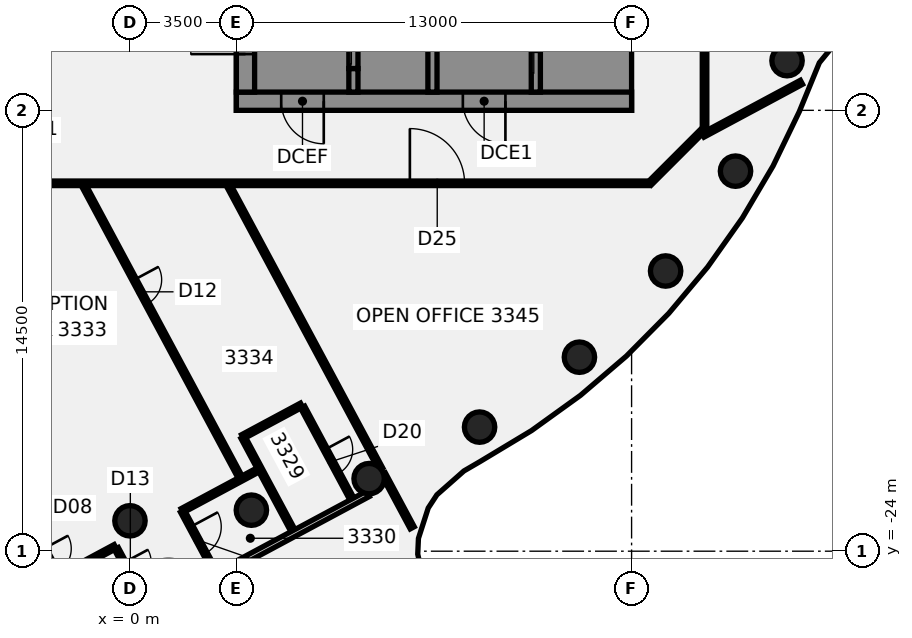
"""IFC4 building model, lengths in metres.
Left out: names, types, materials, properties, quantities, classifications, styles, units other than length and angle.
Written with IfcOpenShell. Run it as: python <this file> out.ifc"""

import sys

from ifc_helpers import new_model, si_unit, direction, frame, frame_2d, origin, origin_2d, place, context, subcontext, project, spatial, polyline, rectangle, circle, outline, extrude, element, fill, save


model = new_model("IFC4")
c1 = context("Model", 3, precision=1e-05, world=origin(), true_north=direction((0.0, 1.0)))
c2 = subcontext(c1, "Body", "Model", "MODEL_VIEW")
j1 = project(units=[si_unit("LENGTHUNIT", "METRE"), si_unit("PLANEANGLEUNIT", "RADIAN")], contexts=[c1])
p1 = place(None, origin())
s1 = spatial("IfcSite", under=j1, at=p1, CompositionType="ELEMENT")
p2 = place(p1, origin())
s2 = spatial("IfcBuilding", under=s1, at=p2, CompositionType="ELEMENT")
p3 = place(p2, frame((0.0, 0.0, 136.75)))
s3 = spatial("IfcBuildingStorey", under=s2, at=p3, CompositionType="ELEMENT", Elevation=136.75)
for number, where, z_axis, x_axis in (
    (1, (0.0, -23.0, -0.14), (0.0, 0.0, 1.0), (1.0, 0.0, 0.0)),
    (2, (3.994, -22.651, -0.14), (0.0, 0.0, 1.0), (1.0, 0.0, 0.0)),
    (3, (7.866, -21.613, -0.14), (0.0, 0.0, 1.0), (1.0, 0.0, 0.0)),
    (4, (11.5, -19.919, -0.14), (0.0, 0.0, 1.0), (1.0, 0.0, 0.0)),
    (5, (14.784, -17.619, -0.14), (0.0, 0.0, 1.0), (1.0, 0.0, 0.0)),
    (6, (17.619, -14.784, -0.14), (0.0, 0.0, 1.0), (1.0, 0.0, 0.0)),
    (7, (19.919, -11.5, -0.14), (0.0, 0.0, 1.0), (1.0, 0.0, 0.0)),
    (8, (21.613, -7.866, -0.14), (0.0, 0.0, 1.0), (1.0, 0.0, 0.0)),
):
    element("IfcColumn", number, at=place(p3, frame(where, z_axis=z_axis, x_axis=x_axis)), inside=s3, PredefinedType="COLUMN", context=c2, shape_type="SweptSolid", body=[
        extrude(circle(Radius=0.5, at=origin_2d()), origin(), (0.0, 0.0, 1.0), 3.75),
    ])
p4 = place(p3, frame((-3.492, -22.682, 0.0), z_axis=(0.0, 0.0, 1.0), x_axis=(0.472689207633, -0.881229205705, 0.0)))
e9 = element("IfcWall", 9, at=p4, inside=s3, PredefinedType="PARTITIONING", context=c2, shape_type="SweptSolid", body=[
    extrude(rectangle(XDim=4.75, YDim=0.15, at=frame_2d((2.375, 0.0))), origin(), (0.0, 0.0, 1.0), 3.01),
])
p5 = place(p4, frame((1.399, 0.0, 0.0)))
e10 = element("IfcOpeningElement", 10, at=p5, cuts=e9, PredefinedType="OPENING", context=c2, shape_type="SweptSolid", body=[
    extrude(rectangle(XDim=0.9, YDim=2.1, at=frame_2d((0.45, 1.05))), frame((0.0, 0.085, 0.0), z_axis=(0.0, -1.0, 0.0), x_axis=(1.0, 0.0, 0.0)), (0.0, 0.0, 1.0), 0.17),
])
p6 = place(p3, frame((-1.51, -11.992, 0.0), z_axis=(0.0, 0.0, 1.0), x_axis=(0.472657089114, -0.881246433247, 0.0)))
e11 = element("IfcWall", 11, at=p6, inside=s3, PredefinedType="PARTITIONING", context=c2, shape_type="SweptSolid", body=[
    extrude(rectangle(XDim=10.853, YDim=0.15, at=frame_2d((5.426, 0.0))), origin(), (0.0, 0.0, 1.0), 3.01),
])
p7 = place(p6, frame((3.495, 0.0, 0.0)))
e12 = element("IfcOpeningElement", 12, at=p7, cuts=e11, PredefinedType="OPENING", context=c2, shape_type="SweptSolid", body=[
    extrude(rectangle(XDim=0.9, YDim=2.1, at=frame_2d((0.45, 1.05))), frame((0.0, 0.085, 0.0), z_axis=(0.0, -1.0, 0.0), x_axis=(1.0, 0.0, 0.0)), (0.0, 0.0, 1.0), 0.17),
])
p8 = place(p3, frame((-0.448, -23.914, 0.0), z_axis=(0.0, 0.0, 1.0), x_axis=(0.472830170136, -0.881153579241, 0.0)))
e13 = element("IfcWall", 13, at=p8, inside=s3, PredefinedType="PARTITIONING", context=c2, shape_type="SweptSolid", body=[
    extrude(rectangle(XDim=2.225, YDim=0.15, at=frame_2d((1.113, 0.0))), origin(), (0.0, 0.0, 1.0), 3.01),
])
p9 = place(p8, frame((0.525, 0.0, 0.0)))
e14 = element("IfcOpeningElement", 14, at=p9, cuts=e13, PredefinedType="OPENING", context=c2, shape_type="SweptSolid", body=[
    extrude(rectangle(XDim=0.9, YDim=2.1, at=frame_2d((0.45, 1.05))), frame((0.0, 0.085, 0.0), z_axis=(0.0, -1.0, 0.0), x_axis=(1.0, 0.0, 0.0)), (0.0, 0.0, 1.0), 0.17),
])
p10 = place(p3, frame((1.729, -22.684, 0.0), z_axis=(0.0, 0.0, 1.0), x_axis=(0.47285390864, -0.881140840663, 0.0)))
e15 = element("IfcWall", 15, at=p10, inside=s3, PredefinedType="PARTITIONING", context=c2, shape_type="SweptSolid", body=[
    extrude(rectangle(XDim=20.305, YDim=0.15, at=frame_2d((10.152, 0.0))), origin(), (0.0, 0.0, 1.0), 3.01),
])
p11 = place(p10, frame((0.58, 0.0, 0.0)))
e16 = element("IfcOpeningElement", 16, at=p11, cuts=e15, PredefinedType="OPENING", context=c2, shape_type="SweptSolid", body=[
    extrude(rectangle(XDim=1.0, YDim=2.1, at=frame_2d((0.5, 1.05))), frame((0.0, 0.085, 0.0), z_axis=(0.0, -1.0, 0.0), x_axis=(1.0, 0.0, 0.0)), (0.0, 0.0, 1.0), 0.17),
])
p12 = place(p10, frame((10.63, 0.0, 0.0)))
e17 = element("IfcOpeningElement", 17, at=p12, cuts=e15, PredefinedType="OPENING", context=c2, shape_type="SweptSolid", body=[
    extrude(rectangle(XDim=0.9, YDim=2.1, at=frame_2d((0.45, 1.05))), frame((0.0, 0.085, 0.0), z_axis=(0.0, -1.0, 0.0), x_axis=(1.0, 0.0, 0.0)), (0.0, 0.0, 1.0), 0.17),
])
p13 = place(p10, frame((17.081, 0.0, 0.0)))
e18 = element("IfcOpeningElement", 18, at=p13, cuts=e15, PredefinedType="OPENING", context=c2, shape_type="SweptSolid", body=[
    extrude(rectangle(XDim=0.9, YDim=2.1, at=frame_2d((0.45, 1.05))), frame((0.0, 0.085, 0.0), z_axis=(0.0, -1.0, 0.0), x_axis=(1.0, 0.0, 0.0)), (0.0, 0.0, 1.0), 0.17),
])
p14 = place(p3, frame((3.257, -11.992, 0.0), z_axis=(0.0, 0.0, 1.0), x_axis=(0.47270123822, -0.881222752421, 0.0)))
e19 = element("IfcWall", 19, at=p14, inside=s3, PredefinedType="PARTITIONING", context=c2, shape_type="SweptSolid", body=[
    extrude(rectangle(XDim=10.56, YDim=0.15, at=frame_2d((5.28, 0.0))), origin(), (0.0, 0.0, 1.0), 3.01),
])
p15 = place(p3, frame((8.336, -21.461, 0.0), z_axis=(0.0, 0.0, 1.0), x_axis=(0.472700307112, -0.881223251881, 0.0)))
e20 = element("IfcWall", 20, at=p15, inside=s3, PredefinedType="PARTITIONING", context=c2, shape_type="SweptSolid", body=[
    extrude(rectangle(XDim=2.009, YDim=0.15, at=frame_2d((1.004, 0.0))), origin(), (0.0, 0.0, 1.0), 3.01),
])
p16 = place(p3, frame((3.717, -20.256, 0.0), z_axis=(0.0, 0.0, 1.0), x_axis=(0.472400501261, -0.881384006213, 0.0)))
e21 = element("IfcWall", 21, at=p16, inside=s3, PredefinedType="PARTITIONING", context=c2, shape_type="SweptSolid", body=[
    extrude(rectangle(XDim=3.48, YDim=0.15, at=frame_2d((1.74, 0.0))), origin(), (0.0, 0.0, 1.0), 3.01),
])
p17 = place(p3, frame((5.681, -19.264, 0.0), z_axis=(0.0, 0.0, 1.0), x_axis=(0.472694703545, -0.881226257689, 0.0)))
e22 = element("IfcWall", 22, at=p17, inside=s3, PredefinedType="PARTITIONING", context=c2, shape_type="SweptSolid", body=[
    extrude(rectangle(XDim=3.421, YDim=0.15, at=frame_2d((1.71, 0.0))), origin(), (0.0, 0.0, 1.0), 3.01),
])
p18 = place(p17, frame((1.575, 0.0, 0.0)))
e23 = element("IfcOpeningElement", 23, at=p18, cuts=e22, PredefinedType="OPENING", context=c2, shape_type="SweptSolid", body=[
    extrude(rectangle(XDim=0.9, YDim=2.1, at=frame_2d((0.45, 1.05))), frame((0.0, 0.085, 0.0), z_axis=(0.0, -1.0, 0.0), x_axis=(1.0, 0.0, 0.0)), (0.0, 0.0, 1.0), 0.17),
])
p19 = place(p3, frame((-17.1, -11.9, 0.0), z_axis=(0.0, 0.0, 1.0), x_axis=(1.0, 0.0, 0.0)))
e24 = element("IfcWall", 24, at=p19, inside=s3, PredefinedType="PARTITIONING", context=c2, shape_type="SweptSolid", body=[
    extrude(rectangle(XDim=34.165, YDim=0.15, at=frame_2d((17.083, 0.0))), origin(), (0.0, 0.0, 1.0), 3.01),
])
p20 = place(p19, frame((10.824, 0.0, 0.0)))
e25 = element("IfcOpeningElement", 25, at=p20, cuts=e24, PredefinedType="OPENING", context=c2, shape_type="SweptSolid", body=[
    extrude(rectangle(XDim=1.8, YDim=2.1, at=frame_2d((0.9, 1.05))), frame((0.0, 0.085, 0.0), z_axis=(0.0, -1.0, 0.0), x_axis=(1.0, 0.0, 0.0)), (0.0, 0.0, 1.0), 0.17),
])
p21 = place(p19, frame((1.65, 0.0, 0.0)))
e26 = element("IfcOpeningElement", 26, at=p21, cuts=e24, PredefinedType="OPENING", context=c2, shape_type="SweptSolid", body=[
    extrude(rectangle(XDim=1.8, YDim=2.1, at=frame_2d((0.9, 1.05))), frame((0.0, 0.085, 0.0), z_axis=(0.0, -1.0, 0.0), x_axis=(1.0, 0.0, 0.0)), (0.0, 0.0, 1.0), 0.17),
])
p22 = place(p19, frame((26.307, 0.0, 0.0)))
e27 = element("IfcOpeningElement", 27, at=p22, cuts=e24, PredefinedType="OPENING", context=c2, shape_type="SweptSolid", body=[
    extrude(rectangle(XDim=1.8, YDim=2.1, at=frame_2d((0.9, 1.05))), frame((0.0, 0.085, 0.0), z_axis=(0.0, -1.0, 0.0), x_axis=(1.0, 0.0, 0.0)), (0.0, 0.0, 1.0), 0.17),
])
p23 = place(p3, frame((3.707, -20.235, 0.0), z_axis=(0.0, 0.0, 1.0), x_axis=(0.881086943658, 0.472954329419, 0.0)))
e28 = element("IfcWall", 28, at=p23, inside=s3, PredefinedType="PARTITIONING", context=c2, shape_type="SweptSolid", body=[
    extrude(rectangle(XDim=2.199, YDim=0.15, at=frame_2d((1.1, 0.0))), origin(), (0.0, 0.0, 1.0), 3.01),
])
p24 = place(p3, frame((-4.107, -28.515, 0.0), z_axis=(0.0, 0.0, 1.0), x_axis=(0.881221254129, 0.472704031368, 0.0)))
e29 = element("IfcWall", 29, at=p24, inside=s3, PredefinedType="PARTITIONING", context=c2, shape_type="SweptSolid", body=[
    extrude(rectangle(XDim=13.545, YDim=0.2, at=frame_2d((6.772, 0.0))), origin(), (0.0, 0.0, 1.0), 3.01),
])
p25 = place(p24, frame((6.099, 0.0, 0.0)))
e30 = element("IfcOpeningElement", 30, at=p25, cuts=e29, PredefinedType="OPENING", context=c2, shape_type="SweptSolid", body=[
    extrude(rectangle(XDim=1.4, YDim=2.1, at=frame_2d((0.7, 1.05))), frame((0.0, 0.11, 0.0), z_axis=(0.0, -1.0, 0.0), x_axis=(1.0, 0.0, 0.0)), (0.0, 0.0, 1.0), 0.22),
])
p26 = place(p3, frame((-2.268, -24.805, 0.0), z_axis=(0.0, 0.0, 1.0), x_axis=(0.881101445607, 0.472927312121, 0.0)))
e31 = element("IfcWall", 31, at=p26, inside=s3, PredefinedType="PARTITIONING", context=c2, shape_type="SweptSolid", body=[
    extrude(rectangle(XDim=2.025, YDim=0.15, at=frame_2d((1.012, 0.0))), origin(), (0.0, 0.0, 1.0), 3.01),
])
p27 = place(p3, frame((1.719, -22.666, 0.0), z_axis=(0.0, 0.0, 1.0), x_axis=(0.881125139321, 0.47288316618, 0.0)))
e32 = element("IfcWall", 32, at=p27, inside=s3, PredefinedType="PARTITIONING", context=c2, shape_type="SweptSolid", body=[
    extrude(rectangle(XDim=2.825, YDim=0.15, at=frame_2d((1.413, 0.0))), origin(), (0.0, 0.0, 1.0), 3.01),
])
p28 = place(p3, frame((18.848, -10.315, 0.0), z_axis=(0.0, 0.0, 1.0), x_axis=(0.881212234006, 0.472720846418, 0.0)))
e33 = element("IfcWall", 33, at=p28, inside=s3, PredefinedType="PARTITIONING", context=c2, shape_type="SweptSolid", body=[
    extrude(rectangle(XDim=3.676, YDim=0.15, at=frame_2d((1.838, 0.0))), origin(), (0.0, 0.0, 1.0), 3.01),
])
p29 = place(p3, frame((17.1, -11.9, 0.0), z_axis=(0.0, 0.0, 1.0), x_axis=(0.707106781187, 0.707106781187, 0.0)))
e34 = element("IfcWall", 34, at=p29, inside=s3, PredefinedType="PARTITIONING", context=c2, shape_type="SweptSolid", body=[
    extrude(rectangle(XDim=2.505, YDim=0.15, at=frame_2d((1.253, 0.0))), origin(), (0.0, 0.0, 1.0), 3.01),
])
p30 = place(p3, frame((18.9, -10.1, 0.0), z_axis=(0.0, 0.0, 1.0), x_axis=(0.0, 1.0, 0.0)))
e35 = element("IfcWall", 35, at=p30, inside=s3, PredefinedType="PARTITIONING", context=c2, shape_type="SweptSolid", body=[
    extrude(rectangle(XDim=20.2, YDim=0.15, at=frame_2d((10.1, 0.0))), origin(), (0.0, 0.0, 1.0), 3.01),
])
p31 = place(p30, frame((8.479, 0.0, 0.0)))
e36 = element("IfcOpeningElement", 36, at=p31, cuts=e35, PredefinedType="OPENING", context=c2, shape_type="SweptSolid", body=[
    extrude(rectangle(XDim=1.8, YDim=2.1, at=frame_2d((0.9, 1.05))), frame((0.0, 0.085, 0.0), z_axis=(0.0, -1.0, 0.0), x_axis=(1.0, 0.0, 0.0)), (0.0, 0.0, 1.0), 0.17),
])
p32 = place(p30, frame((13.645, 0.0, 0.0)))
e37 = element("IfcOpeningElement", 37, at=p32, cuts=e35, PredefinedType="OPENING", context=c2, shape_type="SweptSolid", body=[
    extrude(rectangle(XDim=0.9, YDim=2.1, at=frame_2d((0.45, 1.05))), frame((0.0, 0.085, 0.0), z_axis=(0.0, -1.0, 0.0), x_axis=(1.0, 0.0, 0.0)), (0.0, 0.0, 1.0), 0.17),
])
p33 = place(p3, frame((16.5, -9.2, 0.0), z_axis=(0.0, 0.0, 1.0), x_axis=(-1.0, 0.0, 0.0)))
e38 = element("IfcWall", 38, at=p33, inside=s3, PredefinedType="SHEAR", context=c2, shape_type="SweptSolid", body=[
    extrude(rectangle(XDim=13.0, YDim=0.6, at=frame_2d((6.5, 0.0))), origin(), (0.0, 0.0, 1.0), 3.61),
])
p34 = place(p33, frame((4.15, 0.0, 0.0)))
e39 = element("IfcOpeningElement", 39, at=p34, cuts=e38, PredefinedType="OPENING", context=c2, shape_type="SweptSolid", body=[
    extrude(rectangle(XDim=1.4, YDim=2.1, at=frame_2d((0.7, 1.05))), frame((0.0, 0.31, 0.0), z_axis=(0.0, -1.0, 0.0), x_axis=(1.0, 0.0, 0.0)), (0.0, 0.0, 1.0), 0.62),
])
p35 = place(p33, frame((10.125, 0.0, 0.0)))
e40 = element("IfcOpeningElement", 40, at=p35, cuts=e38, PredefinedType="OPENING", context=c2, shape_type="SweptSolid", body=[
    extrude(rectangle(XDim=1.4, YDim=2.1, at=frame_2d((0.7, 1.05))), frame((0.0, 0.31, 0.0), z_axis=(0.0, -1.0, 0.0), x_axis=(1.0, 0.0, 0.0)), (0.0, 0.0, 1.0), 0.62),
])
p36 = place(p3, origin())
e41 = element("IfcWall", 41, at=p36, inside=s3, PredefinedType="SHEAR", context=c2, shape_type="SweptSolid", body=[
    extrude(outline(polyline([(13.5, -8.125), (13.5, -8.9), (15.9, -8.9), (16.5, -8.9), (16.5, 8.9), (15.9, 8.9), (13.5, 8.9), (13.5, 8.125), (15.9, 8.125), (15.9, 5.625), (13.5, 5.625), (13.5, 5.375), (15.9, 5.375), (15.9, -5.375), (13.5, -5.375), (13.5, -5.625), (15.9, -5.625), (15.9, -8.125), (13.5, -8.125)])), origin(), (0.0, 0.0, 1.0), 3.61),
])
p37 = place(p3, origin())
e42 = element("IfcWall", 42, at=p37, inside=s3, PredefinedType="SHEAR", context=c2, shape_type="SweptSolid", body=[
    extrude(outline(polyline([(7.5, -8.125), (7.5, -8.9), (9.8, -8.9), (9.8, -8.125), (9.8, -5.625), (9.55, -5.625), (9.55, -8.125), (7.5, -8.125)])), origin(), (0.0, 0.0, 1.0), 3.61),
])
p38 = place(p3, frame((7.35, -8.9, 0.0), z_axis=(0.0, 0.0, 1.0), x_axis=(0.0, 1.0, 0.0)))
e43 = element("IfcWall", 43, at=p38, inside=s3, PredefinedType="SHEAR", context=c2, shape_type="SweptSolid", body=[
    extrude(rectangle(XDim=0.775, YDim=0.3, at=frame_2d((0.387, 0.0))), origin(), (0.0, 0.0, 1.0), 3.61),
])
p39 = place(p3, frame((13.35, -8.9, 0.0), z_axis=(0.0, 0.0, 1.0), x_axis=(0.0, 1.0, 0.0)))
e44 = element("IfcWall", 44, at=p39, inside=s3, PredefinedType="SHEAR", context=c2, shape_type="SweptSolid", body=[
    extrude(rectangle(XDim=17.8, YDim=0.3, at=frame_2d((8.9, 0.0))), origin(), (0.0, 0.0, 1.0), 3.61),
])
p40 = place(p39, frame((1.325, 0.0, 0.0)))
e45 = element("IfcOpeningElement", 45, at=p40, cuts=e44, PredefinedType="OPENING", context=c2, shape_type="SweptSolid", body=[
    extrude(rectangle(XDim=1.4, YDim=2.1, at=frame_2d((0.7, 1.05))), frame((0.0, 0.16, 0.0), z_axis=(0.0, -1.0, 0.0), x_axis=(1.0, 0.0, 0.0)), (0.0, 0.0, 1.0), 0.32),
])
p41 = place(p39, frame((6.546, 0.0, 0.0)))
e46 = element("IfcOpeningElement", 46, at=p41, cuts=e44, PredefinedType="OPENING", context=c2, shape_type="SweptSolid", body=[
    extrude(rectangle(XDim=1.0, YDim=2.1, at=frame_2d((0.5, 1.05))), frame((0.0, 0.16, 0.0), z_axis=(0.0, -1.0, 0.0), x_axis=(1.0, 0.0, 0.0)), (0.0, 0.0, 1.0), 0.32),
])
p42 = place(p39, frame((12.046, 0.0, 0.0)))
e47 = element("IfcOpeningElement", 47, at=p42, cuts=e44, PredefinedType="OPENING", context=c2, shape_type="SweptSolid", body=[
    extrude(rectangle(XDim=1.0, YDim=2.1, at=frame_2d((0.5, 1.05))), frame((0.0, 0.16, 0.0), z_axis=(0.0, -1.0, 0.0), x_axis=(1.0, 0.0, 0.0)), (0.0, 0.0, 1.0), 0.32),
])
p43 = place(p3, frame((9.95, -8.9, 0.0), z_axis=(0.0, 0.0, 1.0), x_axis=(0.0, 1.0, 0.0)))
e48 = element("IfcWall", 48, at=p43, inside=s3, PredefinedType="SHEAR", context=c2, shape_type="SweptSolid", body=[
    extrude(rectangle(XDim=17.8, YDim=0.3, at=frame_2d((8.9, 0.0))), origin(), (0.0, 0.0, 1.0), 3.61),
])
p44 = place(p43, frame((4.175, 0.0, 0.0)))
e49 = element("IfcOpeningElement", 49, at=p44, cuts=e48, PredefinedType="OPENING", context=c2, shape_type="SweptSolid", body=[
    extrude(rectangle(XDim=1.2, YDim=2.1, at=frame_2d((0.6, 1.05))), frame((0.0, 0.16, 0.0), z_axis=(0.0, -1.0, 0.0), x_axis=(1.0, 0.0, 0.0)), (0.0, 0.0, 1.0), 0.32),
])
p45 = place(p43, frame((6.925, 0.0, 0.0)))
e50 = element("IfcOpeningElement", 50, at=p45, cuts=e48, PredefinedType="OPENING", context=c2, shape_type="SweptSolid", body=[
    extrude(rectangle(XDim=1.2, YDim=2.1, at=frame_2d((0.6, 1.05))), frame((0.0, 0.16, 0.0), z_axis=(0.0, -1.0, 0.0), x_axis=(1.0, 0.0, 0.0)), (0.0, 0.0, 1.0), 0.32),
])
p46 = place(p3, frame((7.35, -8.125, 0.0), z_axis=(0.0, 0.0, 1.0), x_axis=(0.0, 1.0, 0.0)))
e51 = element("IfcWall", 51, at=p46, inside=s3, PredefinedType="SHEAR", context=c2, shape_type="SweptSolid", body=[
    extrude(rectangle(XDim=2.5, YDim=0.3, at=frame_2d((1.25, 0.0))), origin(), (0.0, 0.0, 1.0), 3.61),
])
p47 = place(p46, frame((0.7, 0.0, 0.0)))
e52 = element("IfcOpeningElement", 52, at=p47, cuts=e51, PredefinedType="OPENING", context=c2, shape_type="SweptSolid", body=[
    extrude(rectangle(XDim=1.1, YDim=2.1, at=frame_2d((0.55, 1.05))), frame((0.0, 0.16, 0.0), z_axis=(0.0, -1.0, 0.0), x_axis=(1.0, 0.0, 0.0)), (0.0, 0.0, 1.0), 0.32),
])
p48 = place(p3, frame((3.8, -8.9, 0.0), z_axis=(0.0, 0.0, 1.0), x_axis=(0.0, 1.0, 0.0)))
e53 = element("IfcWall", 53, at=p48, inside=s3, PredefinedType="SHEAR", context=c2, shape_type="SweptSolid", body=[
    extrude(rectangle(XDim=17.8, YDim=0.6, at=frame_2d((8.9, 0.0))), origin(), (0.0, 0.0, 1.0), 3.61),
])
p49 = place(p48, frame((1.25, 0.0, 0.0)))
e54 = element("IfcOpeningElement", 54, at=p49, cuts=e53, PredefinedType="OPENING", context=c2, shape_type="SweptSolid", body=[
    extrude(rectangle(XDim=1.8, YDim=2.1, at=frame_2d((0.9, 1.05))), frame((0.0, 0.31, 0.0), z_axis=(0.0, -1.0, 0.0), x_axis=(1.0, 0.0, 0.0)), (0.0, 0.0, 1.0), 0.62),
])
p50 = place(p48, frame((13.8, 0.0, 0.0)))
e55 = element("IfcOpeningElement", 55, at=p50, cuts=e53, PredefinedType="OPENING", context=c2, shape_type="SweptSolid", body=[
    extrude(rectangle(XDim=1.0, YDim=2.1, at=frame_2d((0.5, 1.05))), frame((0.0, 0.31, 0.0), z_axis=(0.0, -1.0, 0.0), x_axis=(1.0, 0.0, 0.0)), (0.0, 0.0, 1.0), 0.62),
])
p51 = place(p5, frame((0.9, 0.0, 0.0), z_axis=(0.0, 0.0, 1.0), x_axis=(-1.0, 0.0, 0.0)))
e56 = element("IfcDoor", 56, at=p51, inside=s3, OperationType="SINGLE_SWING_LEFT", PredefinedType="DOOR", context=c2, shape_type="SweptSolid", body=[
    extrude(rectangle(XDim=0.9, YDim=2.1, at=frame_2d((0.45, 1.05))), frame((0.0, 0.025, 0.0), z_axis=(0.0, -1.0, 0.0), x_axis=(1.0, 0.0, 0.0)), (0.0, 0.0, 1.0), 0.05),
])
fill(e10, e56)
p52 = place(p7, origin())
e57 = element("IfcDoor", 57, at=p52, inside=s3, OperationType="SINGLE_SWING_RIGHT", PredefinedType="DOOR", context=c2, shape_type="SweptSolid", body=[
    extrude(rectangle(XDim=0.9, YDim=2.1, at=frame_2d((0.45, 1.05))), frame((0.0, 0.025, 0.0), z_axis=(0.0, -1.0, 0.0), x_axis=(1.0, 0.0, 0.0)), (0.0, 0.0, 1.0), 0.05),
])
fill(e12, e57)
p53 = place(p11, origin())
e58 = element("IfcDoor", 58, at=p53, inside=s3, OperationType="SINGLE_SWING_RIGHT", PredefinedType="DOOR", context=c2, shape_type="SweptSolid", body=[
    extrude(rectangle(XDim=1.0, YDim=2.1, at=frame_2d((0.5, 1.05))), frame((0.0, 0.025, 0.0), z_axis=(0.0, -1.0, 0.0), x_axis=(1.0, 0.0, 0.0)), (0.0, 0.0, 1.0), 0.05),
])
fill(e16, e58)
p54 = place(p18, frame((0.9, 0.0, 0.0), z_axis=(0.0, 0.0, 1.0), x_axis=(-1.0, 0.0, 0.0)))
e59 = element("IfcDoor", 59, at=p54, inside=s3, OperationType="SINGLE_SWING_RIGHT", PredefinedType="DOOR", context=c2, shape_type="SweptSolid", body=[
    extrude(rectangle(XDim=0.9, YDim=2.1, at=frame_2d((0.45, 1.05))), frame((0.0, 0.025, 0.0), z_axis=(0.0, -1.0, 0.0), x_axis=(1.0, 0.0, 0.0)), (0.0, 0.0, 1.0), 0.05),
])
fill(e23, e59)
p55 = place(p22, frame((1.8, 0.0, 0.0), z_axis=(0.0, 0.0, 1.0), x_axis=(-1.0, 0.0, 0.0)))
e60 = element("IfcDoor", 60, at=p55, inside=s3, OperationType="DOUBLE_DOOR_SINGLE_SWING", PredefinedType="DOOR", context=c2, shape_type="SweptSolid", body=[
    extrude(rectangle(XDim=1.8, YDim=2.1, at=frame_2d((0.9, 1.05))), frame((0.0, 0.025, 0.0), z_axis=(0.0, -1.0, 0.0), x_axis=(1.0, 0.0, 0.0)), (0.0, 0.0, 1.0), 0.05),
])
fill(e27, e60)
p56 = place(p34, origin())
e61 = element("IfcDoor", 61, at=p56, inside=s3, OperationType="SINGLE_SWING_LEFT", PredefinedType="DOOR", context=c2, shape_type="SweptSolid", body=[
    extrude(rectangle(XDim=1.4, YDim=2.1, at=frame_2d((0.7, 1.05))), frame((0.0, 0.025, 0.0), z_axis=(0.0, -1.0, 0.0), x_axis=(1.0, 0.0, 0.0)), (0.0, 0.0, 1.0), 0.05),
])
fill(e39, e61)
p57 = place(p35, origin())
e62 = element("IfcDoor", 62, at=p57, inside=s3, OperationType="SINGLE_SWING_LEFT", PredefinedType="DOOR", context=c2, shape_type="SweptSolid", body=[
    extrude(rectangle(XDim=1.4, YDim=2.1, at=frame_2d((0.7, 1.05))), frame((0.0, 0.025, 0.0), z_axis=(0.0, -1.0, 0.0), x_axis=(1.0, 0.0, 0.0)), (0.0, 0.0, 1.0), 0.05),
])
fill(e40, e62)
p58 = place(p49, origin())
e63 = element("IfcDoor", 63, at=p58, inside=s3, OperationType="SINGLE_SWING_LEFT", PredefinedType="DOOR", context=c2, shape_type="SweptSolid", body=[
    extrude(rectangle(XDim=1.8, YDim=2.1, at=frame_2d((0.9, 1.05))), frame((0.0, 0.025, 0.0), z_axis=(0.0, -1.0, 0.0), x_axis=(1.0, 0.0, 0.0)), (0.0, 0.0, 1.0), 0.05),
])
fill(e54, e63)
save(model, sys.argv[1])
